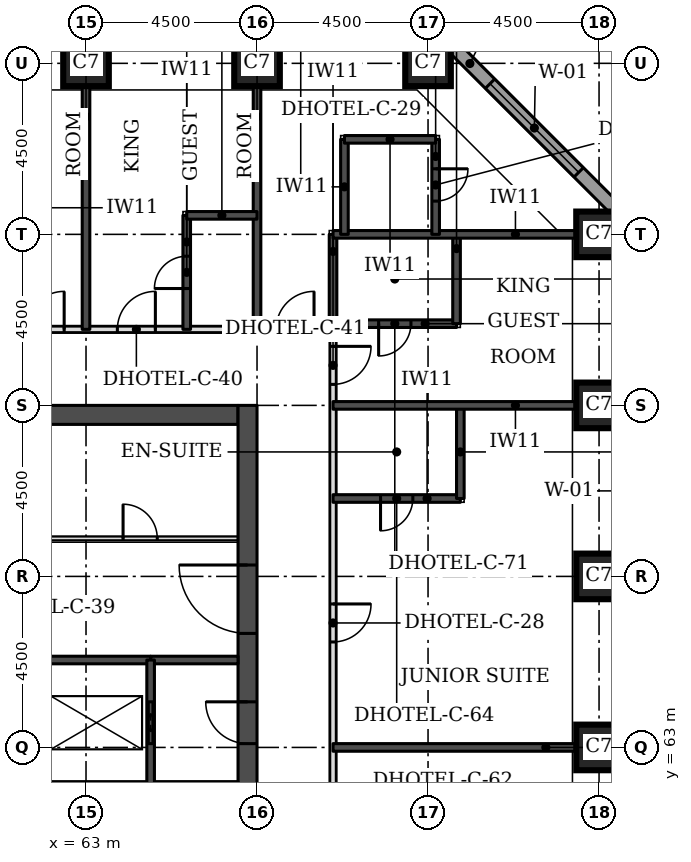
"""IFC4 building model, lengths in metres.
Left out: names, types, materials, properties, quantities, classifications, styles, units other than length and angle.
Written with IfcOpenShell. Run it as: python <this file> out.ifc"""

import sys

from ifc_helpers import new_model, si_unit, direction, frame, frame_2d, origin, origin_2d, place, context, subcontext, project, spatial, rectangle, extrude, element, fill, save


model = new_model("IFC4")
c1 = context("Model", 3, precision=1e-05, world=origin(), true_north=direction((0.0, 1.0)))
c2 = subcontext(c1, "Body", "Model", "MODEL_VIEW")
j1 = project(units=[si_unit("LENGTHUNIT", "METRE"), si_unit("PLANEANGLEUNIT", "RADIAN")], contexts=[c1])
p1 = place(None, origin())
s1 = spatial("IfcSite", under=j1, at=p1, CompositionType="ELEMENT")
p2 = place(p1, origin())
s2 = spatial("IfcBuilding", under=s1, at=p2, CompositionType="ELEMENT")
p3 = place(p2, frame((0.0, 0.0, 56.1)))
s3 = spatial("IfcBuildingStorey", under=s2, at=p3, CompositionType="ELEMENT", Elevation=56.1)
for number, where, z_axis, x_axis in (
    (1, (76.5, 63.0, 0.0), (0.0, 0.0, 1.0), (1.0, 0.0, 0.0)),
    (2, (76.5, 67.5, 0.0), (0.0, 0.0, 1.0), (1.0, 0.0, 0.0)),
    (3, (76.5, 72.0, 0.0), (0.0, 0.0, 1.0), (1.0, 0.0, 0.0)),
    (4, (76.5, 76.5, 0.0), (0.0, 0.0, 1.0), (1.0, 0.0, 0.0)),
    (5, (63.0, 81.0, 0.0), (0.0, 0.0, 1.0), (1.0, 0.0, 0.0)),
    (6, (67.5, 81.0, 0.0), (0.0, 0.0, 1.0), (1.0, 0.0, 0.0)),
    (7, (72.0, 81.0, 0.0), (0.0, 0.0, 1.0), (1.0, 0.0, 0.0)),
):
    element("IfcColumn", number, at=place(p3, frame(where, z_axis=z_axis, x_axis=x_axis)), inside=s3, PredefinedType="COLUMN", context=c2, shape_type="SweptSolid", body=[
        extrude(rectangle(XDim=1.2, YDim=1.2, at=origin_2d()), origin(), (0.0, 0.0, 1.0), 3.3),
    ])
p4 = place(p3, frame((45.5, 71.75, 0.0), z_axis=(0.0, 0.0, 1.0), x_axis=(1.0, 0.0, 0.0)))
e8 = element("IfcWall", 8, at=p4, inside=s3, PredefinedType="SHEAR", context=c2, shape_type="SweptSolid", body=[
    extrude(rectangle(XDim=21.5, YDim=0.5, at=frame_2d((10.75, 0.0))), origin(), (0.0, 0.0, 1.0), 3.3),
])
p5 = place(p3, frame((67.25, 49.5, 0.0), z_axis=(0.0, 0.0, 1.0), x_axis=(0.0, 1.0, 0.0)))
e9 = element("IfcWall", 9, at=p5, inside=s3, PredefinedType="SHEAR", context=c2, shape_type="SweptSolid", body=[
    extrude(rectangle(XDim=22.5, YDim=0.5, at=frame_2d((11.25, 0.0))), origin(), (0.0, 0.0, 1.0), 3.3),
])
p6 = place(p5, frame((4.2, 0.0, 0.0)))
e10 = element("IfcOpeningElement", 10, at=p6, cuts=e9, PredefinedType="OPENING", context=c2, shape_type="SweptSolid", body=[
    extrude(rectangle(XDim=1.8, YDim=2.1, at=frame_2d((0.9, 1.05))), frame((0.0, 0.26, 0.0), z_axis=(0.0, -1.0, 0.0), x_axis=(1.0, 0.0, 0.0)), (0.0, 0.0, 1.0), 0.52),
])
p7 = place(p5, frame((6.9, 0.0, 0.0)))
e11 = element("IfcOpeningElement", 11, at=p7, cuts=e9, PredefinedType="OPENING", context=c2, shape_type="SweptSolid", body=[
    extrude(rectangle(XDim=1.1, YDim=2.1, at=frame_2d((0.55, 1.05))), frame((0.0, 0.26, 0.0), z_axis=(0.0, -1.0, 0.0), x_axis=(1.0, 0.0, 0.0)), (0.0, 0.0, 1.0), 0.52),
])
p8 = place(p5, frame((13.6, 0.0, 0.0)))
e12 = element("IfcOpeningElement", 12, at=p8, cuts=e9, PredefinedType="OPENING", context=c2, shape_type="SweptSolid", body=[
    extrude(rectangle(XDim=1.1, YDim=2.1, at=frame_2d((0.55, 1.05))), frame((0.0, 0.26, 0.0), z_axis=(0.0, -1.0, 0.0), x_axis=(1.0, 0.0, 0.0)), (0.0, 0.0, 1.0), 0.52),
])
p9 = place(p5, frame((16.5, 0.0, 0.0)))
e13 = element("IfcOpeningElement", 13, at=p9, cuts=e9, PredefinedType="OPENING", context=c2, shape_type="SweptSolid", body=[
    extrude(rectangle(XDim=1.8, YDim=2.1, at=frame_2d((0.9, 1.05))), frame((0.0, 0.26, 0.0), z_axis=(0.0, -1.0, 0.0), x_axis=(1.0, 0.0, 0.0)), (0.0, 0.0, 1.0), 0.52),
])
p10 = place(p3, frame((77.326, 76.77, 0.0), z_axis=(0.0, 0.0, 1.0), x_axis=(-0.707106781187, 0.707106781187, 0.0)))
e14 = element("IfcWall", 14, at=p10, inside=s3, PredefinedType="STANDARD", context=c2, shape_type="SweptSolid", body=[
    extrude(rectangle(XDim=7.151, YDim=0.35, at=frame_2d((3.576, 0.0))), origin(), (0.0, 0.0, 1.0), 3.055),
])
p11 = place(p10, frame((1.926, 0.0, 0.8)))
e15 = element("IfcOpeningElement", 15, at=p11, cuts=e14, PredefinedType="OPENING", context=c2, shape_type="SweptSolid", body=[
    extrude(rectangle(XDim=3.3, YDim=1.5, at=frame_2d((1.65, 0.75))), frame((0.0, 0.185, 0.0), z_axis=(0.0, -1.0, 0.0), x_axis=(1.0, 0.0, 0.0)), (0.0, 0.0, 1.0), 0.37),
])
p12 = place(p3, frame((69.5, 47.5, 0.0), z_axis=(0.0, 0.0, 1.0), x_axis=(0.0, 1.0, 0.0)))
e16 = element("IfcWall", 16, at=p12, inside=s3, PredefinedType="PARTITIONING", context=c2, shape_type="SweptSolid", body=[
    extrude(rectangle(XDim=26.5, YDim=0.15, at=frame_2d((13.25, 0.0))), origin(), (0.0, 0.0, 1.0), 3.08),
])
p13 = place(p12, frame((25.053, 0.0, 0.0)))
e17 = element("IfcOpeningElement", 17, at=p13, cuts=e16, PredefinedType="OPENING", context=c2, shape_type="SweptSolid", body=[
    extrude(rectangle(XDim=1.0, YDim=2.1, at=frame_2d((0.5, 1.05))), frame((0.0, 0.085, 0.0), z_axis=(0.0, -1.0, 0.0), x_axis=(1.0, 0.0, 0.0)), (0.0, 0.0, 1.0), 0.17),
])
p14 = place(p12, frame((18.275, 0.0, 0.0)))
e18 = element("IfcOpeningElement", 18, at=p14, cuts=e16, PredefinedType="OPENING", context=c2, shape_type="SweptSolid", body=[
    extrude(rectangle(XDim=1.0, YDim=2.1, at=frame_2d((0.5, 1.05))), frame((0.0, 0.085, 0.0), z_axis=(0.0, -1.0, 0.0), x_axis=(1.0, 0.0, 0.0)), (0.0, 0.0, 1.0), 0.17),
])
p15 = place(p12, frame((12.15, 0.0, 0.0)))
e19 = element("IfcOpeningElement", 19, at=p15, cuts=e16, PredefinedType="OPENING", context=c2, shape_type="SweptSolid", body=[
    extrude(rectangle(XDim=1.1, YDim=2.1, at=frame_2d((0.55, 1.05))), frame((0.0, 0.085, 0.0), z_axis=(0.0, -1.0, 0.0), x_axis=(1.0, 0.0, 0.0)), (0.0, 0.0, 1.0), 0.17),
])
p16 = place(p12, frame((2.825, 0.0, 0.0)))
e20 = element("IfcOpeningElement", 20, at=p16, cuts=e16, PredefinedType="OPENING", context=c2, shape_type="SweptSolid", body=[
    extrude(rectangle(XDim=1.0, YDim=2.1, at=frame_2d((0.5, 1.05))), frame((0.0, 0.085, 0.0), z_axis=(0.0, -1.0, 0.0), x_axis=(1.0, 0.0, 0.0)), (0.0, 0.0, 1.0), 0.17),
])
p17 = place(p12, frame((0.447, 0.0, 0.0)))
e21 = element("IfcOpeningElement", 21, at=p17, cuts=e16, PredefinedType="OPENING", context=c2, shape_type="SweptSolid", body=[
    extrude(rectangle(XDim=1.0, YDim=2.1, at=frame_2d((0.5, 1.05))), frame((0.0, 0.085, 0.0), z_axis=(0.0, -1.0, 0.0), x_axis=(1.0, 0.0, 0.0)), (0.0, 0.0, 1.0), 0.17),
])
p18 = place(p3, frame((43.0, 74.0, 0.0), z_axis=(0.0, 0.0, 1.0), x_axis=(1.0, 0.0, 0.0)))
e22 = element("IfcWall", 22, at=p18, inside=s3, PredefinedType="PARTITIONING", context=c2, shape_type="SweptSolid", body=[
    extrude(rectangle(XDim=26.5, YDim=0.15, at=frame_2d((13.25, 0.0))), origin(), (0.0, 0.0, 1.0), 3.08),
])
p19 = place(p18, frame((2.825, 0.0, 0.0)))
e23 = element("IfcOpeningElement", 23, at=p19, cuts=e22, PredefinedType="OPENING", context=c2, shape_type="SweptSolid", body=[
    extrude(rectangle(XDim=1.0, YDim=2.1, at=frame_2d((0.5, 1.05))), frame((0.0, 0.085, 0.0), z_axis=(0.0, -1.0, 0.0), x_axis=(1.0, 0.0, 0.0)), (0.0, 0.0, 1.0), 0.17),
])
p20 = place(p18, frame((9.425, 0.0, 0.0)))
e24 = element("IfcOpeningElement", 24, at=p20, cuts=e22, PredefinedType="OPENING", context=c2, shape_type="SweptSolid", body=[
    extrude(rectangle(XDim=1.0, YDim=2.1, at=frame_2d((0.5, 1.05))), frame((0.0, 0.085, 0.0), z_axis=(0.0, -1.0, 0.0), x_axis=(1.0, 0.0, 0.0)), (0.0, 0.0, 1.0), 0.17),
])
p21 = place(p18, frame((11.825, 0.0, 0.0)))
e25 = element("IfcOpeningElement", 25, at=p21, cuts=e22, PredefinedType="OPENING", context=c2, shape_type="SweptSolid", body=[
    extrude(rectangle(XDim=1.0, YDim=2.1, at=frame_2d((0.5, 1.05))), frame((0.0, 0.085, 0.0), z_axis=(0.0, -1.0, 0.0), x_axis=(1.0, 0.0, 0.0)), (0.0, 0.0, 1.0), 0.17),
])
p22 = place(p18, frame((18.425, 0.0, 0.0)))
e26 = element("IfcOpeningElement", 26, at=p22, cuts=e22, PredefinedType="OPENING", context=c2, shape_type="SweptSolid", body=[
    extrude(rectangle(XDim=1.0, YDim=2.1, at=frame_2d((0.5, 1.05))), frame((0.0, 0.085, 0.0), z_axis=(0.0, -1.0, 0.0), x_axis=(1.0, 0.0, 0.0)), (0.0, 0.0, 1.0), 0.17),
])
p23 = place(p18, frame((20.825, 0.0, 0.0)))
e27 = element("IfcOpeningElement", 27, at=p23, cuts=e22, PredefinedType="OPENING", context=c2, shape_type="SweptSolid", body=[
    extrude(rectangle(XDim=1.0, YDim=2.1, at=frame_2d((0.5, 1.05))), frame((0.0, 0.085, 0.0), z_axis=(0.0, -1.0, 0.0), x_axis=(1.0, 0.0, 0.0)), (0.0, 0.0, 1.0), 0.17),
])
p24 = place(p18, frame((0.5, 0.0, 0.0)))
e28 = element("IfcOpeningElement", 28, at=p24, cuts=e22, PredefinedType="OPENING", context=c2, shape_type="SweptSolid", body=[
    extrude(rectangle(XDim=1.0, YDim=2.1, at=frame_2d((0.5, 1.05))), frame((0.0, 0.085, 0.0), z_axis=(0.0, -1.0, 0.0), x_axis=(1.0, 0.0, 0.0)), (0.0, 0.0, 1.0), 0.17),
])
p25 = place(p18, frame((25.0, 0.0, 0.0)))
e29 = element("IfcOpeningElement", 29, at=p25, cuts=e22, PredefinedType="OPENING", context=c2, shape_type="SweptSolid", body=[
    extrude(rectangle(XDim=1.0, YDim=2.1, at=frame_2d((0.5, 1.05))), frame((0.0, 0.085, 0.0), z_axis=(0.0, -1.0, 0.0), x_axis=(1.0, 0.0, 0.0)), (0.0, 0.0, 1.0), 0.17),
])
p26 = place(p3, frame((69.5, 63.0, 0.0), z_axis=(0.0, 0.0, 1.0), x_axis=(1.0, 0.0, 0.0)))
e30 = element("IfcWall", 30, at=p26, inside=s3, PredefinedType="SOLIDWALL", context=c2, shape_type="SweptSolid", body=[
    extrude(rectangle(XDim=6.4, YDim=0.2, at=frame_2d((3.2, 0.0))), origin(), (0.0, 0.0, 1.0), 3.08),
])
p27 = place(p3, frame((69.5, 69.55, 0.0), z_axis=(0.0, 0.0, 1.0), x_axis=(1.0, 0.0, 0.0)))
e31 = element("IfcWall", 31, at=p27, inside=s3, PredefinedType="SOLIDWALL", context=c2, shape_type="SweptSolid", body=[
    extrude(rectangle(XDim=3.35, YDim=0.2, at=frame_2d((1.675, 0.0))), origin(), (0.0, 0.0, 1.0), 3.08),
])
p28 = place(p27, frame((1.25, 0.0, 0.0)))
e32 = element("IfcOpeningElement", 32, at=p28, cuts=e31, PredefinedType="OPENING", context=c2, shape_type="SweptSolid", body=[
    extrude(rectangle(XDim=0.85, YDim=2.1, at=frame_2d((0.425, 1.05))), frame((0.0, 0.11, 0.0), z_axis=(0.0, -1.0, 0.0), x_axis=(1.0, 0.0, 0.0)), (0.0, 0.0, 1.0), 0.22),
])
p29 = place(p3, frame((72.85, 69.55, 0.0), z_axis=(0.0, 0.0, 1.0), x_axis=(0.0, 1.0, 0.0)))
e33 = element("IfcWall", 33, at=p29, inside=s3, PredefinedType="SOLIDWALL", context=c2, shape_type="SweptSolid", body=[
    extrude(rectangle(XDim=2.45, YDim=0.2, at=frame_2d((1.225, 0.0))), origin(), (0.0, 0.0, 1.0), 3.08),
])
for number, where, z_axis, x_axis in (
    (34, (69.5, 72.0, 0.0), (0.0, 0.0, 1.0), (1.0, 0.0, 0.0)),
    (35, (63.0, 74.0, 0.0), (0.0, 0.0, 1.0), (0.0, 1.0, 0.0)),
):
    element("IfcWall", number, at=place(p3, frame(where, z_axis=z_axis, x_axis=x_axis)), inside=s3, PredefinedType="SOLIDWALL", context=c2, shape_type="SweptSolid", body=[
        extrude(rectangle(XDim=6.4, YDim=0.2, at=frame_2d((3.2, 0.0))), origin(), (0.0, 0.0, 1.0), 3.08),
    ])
p30 = place(p3, frame((65.65, 74.0, 0.0), z_axis=(0.0, 0.0, 1.0), x_axis=(0.0, 1.0, 0.0)))
e36 = element("IfcWall", 36, at=p30, inside=s3, PredefinedType="SOLIDWALL", context=c2, shape_type="SweptSolid", body=[
    extrude(rectangle(XDim=3.0, YDim=0.2, at=frame_2d((1.5, 0.0))), origin(), (0.0, 0.0, 1.0), 3.08),
])
p31 = place(p30, frame((1.075, 0.0, 0.0)))
e37 = element("IfcOpeningElement", 37, at=p31, cuts=e36, PredefinedType="OPENING", context=c2, shape_type="SweptSolid", body=[
    extrude(rectangle(XDim=0.85, YDim=2.1, at=frame_2d((0.425, 1.05))), frame((0.0, 0.11, 0.0), z_axis=(0.0, -1.0, 0.0), x_axis=(1.0, 0.0, 0.0)), (0.0, 0.0, 1.0), 0.22),
])
p32 = place(p3, frame((67.5, 74.0, 0.0), z_axis=(0.0, 0.0, 1.0), x_axis=(0.0, 1.0, 0.0)))
e38 = element("IfcWall", 38, at=p32, inside=s3, PredefinedType="SOLIDWALL", context=c2, shape_type="SweptSolid", body=[
    extrude(rectangle(XDim=6.4, YDim=0.2, at=frame_2d((3.2, 0.0))), origin(), (0.0, 0.0, 1.0), 3.08),
])
p33 = place(p3, frame((69.5, 74.0, 0.0), z_axis=(0.0, 0.0, 1.0), x_axis=(0.0, 1.0, 0.0)))
e39 = element("IfcWall", 39, at=p33, inside=s3, PredefinedType="SOLIDWALL", context=c2, shape_type="SweptSolid", body=[
    extrude(rectangle(XDim=2.5, YDim=0.2, at=frame_2d((1.25, 0.0))), origin(), (0.0, 0.0, 1.0), 3.08),
])
p34 = place(p3, frame((69.5, 74.15, 0.0), z_axis=(0.0, 0.0, 1.0), x_axis=(1.0, 0.0, 0.0)))
e40 = element("IfcWall", 40, at=p34, inside=s3, PredefinedType="SOLIDWALL", context=c2, shape_type="SweptSolid", body=[
    extrude(rectangle(XDim=3.25, YDim=0.2, at=frame_2d((1.625, 0.0))), origin(), (0.0, 0.0, 1.0), 3.08),
])
p35 = place(p34, frame((1.2, 0.0, 0.0)))
e41 = element("IfcOpeningElement", 41, at=p35, cuts=e40, PredefinedType="OPENING", context=c2, shape_type="SweptSolid", body=[
    extrude(rectangle(XDim=0.85, YDim=2.1, at=frame_2d((0.425, 1.05))), frame((0.0, 0.11, 0.0), z_axis=(0.0, -1.0, 0.0), x_axis=(1.0, 0.0, 0.0)), (0.0, 0.0, 1.0), 0.22),
])
p36 = place(p3, frame((72.75, 74.15, 0.0), z_axis=(0.0, 0.0, 1.0), x_axis=(0.0, 1.0, 0.0)))
e42 = element("IfcWall", 42, at=p36, inside=s3, PredefinedType="SOLIDWALL", context=c2, shape_type="SweptSolid", body=[
    extrude(rectangle(XDim=2.35, YDim=0.2, at=frame_2d((1.175, 0.0))), origin(), (0.0, 0.0, 1.0), 3.08),
])
p37 = place(p3, frame((69.5, 76.5, 0.0), z_axis=(0.0, 0.0, 1.0), x_axis=(1.0, 0.0, 0.0)))
e43 = element("IfcWall", 43, at=p37, inside=s3, PredefinedType="SOLIDWALL", context=c2, shape_type="SweptSolid", body=[
    extrude(rectangle(XDim=6.4, YDim=0.2, at=frame_2d((3.2, 0.0))), origin(), (0.0, 0.0, 1.0), 3.08),
])
p38 = place(p3, frame((69.8, 76.5, 0.0), z_axis=(0.0, 0.0, 1.0), x_axis=(0.0, 1.0, 0.0)))
e44 = element("IfcWall", 44, at=p38, inside=s3, PredefinedType="SOLIDWALL", context=c2, shape_type="SweptSolid", body=[
    extrude(rectangle(XDim=2.5, YDim=0.2, at=frame_2d((1.25, 0.0))), origin(), (0.0, 0.0, 1.0), 3.08),
])
p39 = place(p3, frame((72.2, 76.5, 0.0), z_axis=(0.0, 0.0, 1.0), x_axis=(0.0, 1.0, 0.0)))
e45 = element("IfcWall", 45, at=p39, inside=s3, PredefinedType="SOLIDWALL", context=c2, shape_type="SweptSolid", body=[
    extrude(rectangle(XDim=2.5, YDim=0.2, at=frame_2d((1.25, 0.0))), origin(), (0.0, 0.0, 1.0), 3.08),
])
p40 = place(p39, frame((0.875, 0.0, 0.0)))
e46 = element("IfcOpeningElement", 46, at=p40, cuts=e45, PredefinedType="OPENING", context=c2, shape_type="SweptSolid", body=[
    extrude(rectangle(XDim=0.85, YDim=2.1, at=frame_2d((0.425, 1.05))), frame((0.0, 0.11, 0.0), z_axis=(0.0, -1.0, 0.0), x_axis=(1.0, 0.0, 0.0)), (0.0, 0.0, 1.0), 0.22),
])
p41 = place(p3, frame((65.65, 77.0, 0.0), z_axis=(0.0, 0.0, 1.0), x_axis=(1.0, 0.0, 0.0)))
e47 = element("IfcWall", 47, at=p41, inside=s3, PredefinedType="SOLIDWALL", context=c2, shape_type="SweptSolid", body=[
    extrude(rectangle(XDim=1.85, YDim=0.2, at=frame_2d((0.925, 0.0))), origin(), (0.0, 0.0, 1.0), 3.08),
])
p42 = place(p3, frame((69.8, 79.0, 0.0), z_axis=(0.0, 0.0, 1.0), x_axis=(1.0, 0.0, 0.0)))
e48 = element("IfcWall", 48, at=p42, inside=s3, PredefinedType="SOLIDWALL", context=c2, shape_type="SweptSolid", body=[
    extrude(rectangle(XDim=2.4, YDim=0.2, at=frame_2d((1.2, 0.0))), origin(), (0.0, 0.0, 1.0), 3.08),
])
p43 = place(p3, frame((64.7, 65.3, 0.0), z_axis=(0.0, 0.0, 1.0), x_axis=(1.0, 0.0, 0.0)))
e49 = element("IfcWall", 49, at=p43, inside=s3, PredefinedType="SOLIDWALL", context=c2, shape_type="SweptSolid", body=[
    extrude(rectangle(XDim=2.3, YDim=0.2, at=frame_2d((1.15, 0.0))), origin(), (0.0, 0.0, 1.0), 3.08),
])
p44 = place(p3, frame((47.8, 65.3, 0.0), z_axis=(0.0, 0.0, 1.0), x_axis=(1.0, 0.0, 0.0)))
e50 = element("IfcWall", 50, at=p44, inside=s3, PredefinedType="SOLIDWALL", context=c2, shape_type="SweptSolid", body=[
    extrude(rectangle(XDim=16.9, YDim=0.2, at=frame_2d((8.45, 0.0))), origin(), (0.0, 0.0, 1.0), 3.08),
])
p45 = place(p3, frame((61.85, 68.5, 0.0), z_axis=(0.0, 0.0, 1.0), x_axis=(1.0, 0.0, 0.0)))
e51 = element("IfcWall", 51, at=p45, inside=s3, PredefinedType="PARTITIONING", context=c2, shape_type="SweptSolid", body=[
    extrude(rectangle(XDim=5.15, YDim=0.1, at=frame_2d((2.575, 0.0))), origin(), (0.0, 0.0, 1.0), 3.08),
])
p46 = place(p45, frame((2.125, 0.0, 0.0)))
e52 = element("IfcOpeningElement", 52, at=p46, cuts=e51, PredefinedType="OPENING", context=c2, shape_type="SweptSolid", body=[
    extrude(rectangle(XDim=0.9, YDim=2.1, at=frame_2d((0.45, 1.05))), frame((0.0, 0.06, 0.0), z_axis=(0.0, -1.0, 0.0), x_axis=(1.0, 0.0, 0.0)), (0.0, 0.0, 1.0), 0.12),
])
p47 = place(p3, frame((64.7, 62.0, 0.0), z_axis=(0.0, 0.0, 1.0), x_axis=(0.0, 1.0, 0.0)))
e53 = element("IfcWall", 53, at=p47, inside=s3, PredefinedType="SOLIDWALL", context=c2, shape_type="SweptSolid", body=[
    extrude(rectangle(XDim=3.3, YDim=0.2, at=frame_2d((1.65, 0.0))), origin(), (0.0, 0.0, 1.0), 3.08),
])
p48 = place(p47, frame((1.1, 0.0, 0.0)))
e54 = element("IfcOpeningElement", 54, at=p48, cuts=e53, PredefinedType="OPENING", context=c2, shape_type="SweptSolid", body=[
    extrude(rectangle(XDim=1.1, YDim=2.1, at=frame_2d((0.55, 1.05))), frame((0.0, 0.11, 0.0), z_axis=(0.0, -1.0, 0.0), x_axis=(1.0, 0.0, 0.0)), (0.0, 0.0, 1.0), 0.22),
])
p49 = place(p11, origin())
e55 = element("IfcWindow", 55, at=p49, inside=s3, PartitioningType="SINGLE_PANEL", PredefinedType="WINDOW", context=c2, shape_type="SweptSolid", body=[
    extrude(rectangle(XDim=3.3, YDim=1.5, at=frame_2d((1.65, 0.75))), frame((0.0, 0.085, 0.0), z_axis=(0.0, -1.0, 0.0), x_axis=(1.0, 0.0, 0.0)), (0.0, 0.0, 1.0), 0.06),
])
fill(e15, e55)
p50 = place(p22, origin())
e56 = element("IfcDoor", 56, at=p50, inside=s3, OperationType="SINGLE_SWING_RIGHT", PredefinedType="DOOR", context=c2, shape_type="SweptSolid", body=[
    extrude(rectangle(XDim=1.0, YDim=2.1, at=frame_2d((0.5, 1.05))), frame((0.0, 0.025, 0.0), z_axis=(0.0, -1.0, 0.0), x_axis=(1.0, 0.0, 0.0)), (0.0, 0.0, 1.0), 0.05),
])
fill(e26, e56)
p51 = place(p23, origin())
e57 = element("IfcDoor", 57, at=p51, inside=s3, OperationType="SINGLE_SWING_RIGHT", PredefinedType="DOOR", context=c2, shape_type="SweptSolid", body=[
    extrude(rectangle(XDim=1.0, YDim=2.1, at=frame_2d((0.5, 1.05))), frame((0.0, 0.025, 0.0), z_axis=(0.0, -1.0, 0.0), x_axis=(1.0, 0.0, 0.0)), (0.0, 0.0, 1.0), 0.05),
])
fill(e27, e57)
p52 = place(p31, origin())
e58 = element("IfcDoor", 58, at=p52, inside=s3, OperationType="SINGLE_SWING_LEFT", PredefinedType="DOOR", context=c2, shape_type="SweptSolid", body=[
    extrude(rectangle(XDim=0.85, YDim=2.1, at=frame_2d((0.425, 1.05))), frame((0.0, 0.025, 0.0), z_axis=(0.0, -1.0, 0.0), x_axis=(1.0, 0.0, 0.0)), (0.0, 0.0, 1.0), 0.05),
])
fill(e37, e58)
p53 = place(p13, frame((1.0, 0.0, 0.0), z_axis=(0.0, 0.0, 1.0), x_axis=(-1.0, 0.0, 0.0)))
e59 = element("IfcDoor", 59, at=p53, inside=s3, OperationType="SINGLE_SWING_LEFT", PredefinedType="DOOR", context=c2, shape_type="SweptSolid", body=[
    extrude(rectangle(XDim=1.0, YDim=2.1, at=frame_2d((0.5, 1.05))), frame((0.0, 0.025, 0.0), z_axis=(0.0, -1.0, 0.0), x_axis=(1.0, 0.0, 0.0)), (0.0, 0.0, 1.0), 0.05),
])
fill(e17, e59)
p54 = place(p35, frame((0.85, 0.0, 0.0), z_axis=(0.0, 0.0, 1.0), x_axis=(-1.0, 0.0, 0.0)))
e60 = element("IfcDoor", 60, at=p54, inside=s3, OperationType="SINGLE_SWING_RIGHT", PredefinedType="DOOR", context=c2, shape_type="SweptSolid", body=[
    extrude(rectangle(XDim=0.85, YDim=2.1, at=frame_2d((0.425, 1.05))), frame((0.0, 0.025, 0.0), z_axis=(0.0, -1.0, 0.0), x_axis=(1.0, 0.0, 0.0)), (0.0, 0.0, 1.0), 0.05),
])
fill(e41, e60)
p55 = place(p14, frame((1.0, 0.0, 0.0), z_axis=(0.0, 0.0, 1.0), x_axis=(-1.0, 0.0, 0.0)))
e61 = element("IfcDoor", 61, at=p55, inside=s3, OperationType="SINGLE_SWING_LEFT", PredefinedType="DOOR", context=c2, shape_type="SweptSolid", body=[
    extrude(rectangle(XDim=1.0, YDim=2.1, at=frame_2d((0.5, 1.05))), frame((0.0, 0.025, 0.0), z_axis=(0.0, -1.0, 0.0), x_axis=(1.0, 0.0, 0.0)), (0.0, 0.0, 1.0), 0.05),
])
fill(e18, e61)
p56 = place(p28, frame((0.85, 0.0, 0.0), z_axis=(0.0, 0.0, 1.0), x_axis=(-1.0, 0.0, 0.0)))
e62 = element("IfcDoor", 62, at=p56, inside=s3, OperationType="SINGLE_SWING_RIGHT", PredefinedType="DOOR", context=c2, shape_type="SweptSolid", body=[
    extrude(rectangle(XDim=0.85, YDim=2.1, at=frame_2d((0.425, 1.05))), frame((0.0, 0.025, 0.0), z_axis=(0.0, -1.0, 0.0), x_axis=(1.0, 0.0, 0.0)), (0.0, 0.0, 1.0), 0.05),
])
fill(e32, e62)
p57 = place(p25, origin())
e63 = element("IfcDoor", 63, at=p57, inside=s3, OperationType="SINGLE_SWING_RIGHT", PredefinedType="DOOR", context=c2, shape_type="SweptSolid", body=[
    extrude(rectangle(XDim=1.0, YDim=2.1, at=frame_2d((0.5, 1.05))), frame((0.0, 0.025, 0.0), z_axis=(0.0, -1.0, 0.0), x_axis=(1.0, 0.0, 0.0)), (0.0, 0.0, 1.0), 0.05),
])
fill(e29, e63)
p58 = place(p40, frame((0.85, 0.0, 0.0), z_axis=(0.0, 0.0, 1.0), x_axis=(-1.0, 0.0, 0.0)))
e64 = element("IfcDoor", 64, at=p58, inside=s3, OperationType="SINGLE_SWING_LEFT", PredefinedType="DOOR", context=c2, shape_type="SweptSolid", body=[
    extrude(rectangle(XDim=0.85, YDim=2.1, at=frame_2d((0.425, 1.05))), frame((0.0, 0.025, 0.0), z_axis=(0.0, -1.0, 0.0), x_axis=(1.0, 0.0, 0.0)), (0.0, 0.0, 1.0), 0.05),
])
fill(e46, e64)
p59 = place(p48, origin())
e65 = element("IfcDoor", 65, at=p59, inside=s3, OperationType="DOUBLE_DOOR_SLIDING", PredefinedType="DOOR", context=c2, shape_type="SweptSolid", body=[
    extrude(rectangle(XDim=1.1, YDim=2.1, at=frame_2d((0.55, 1.05))), frame((0.0, 0.025, 0.0), z_axis=(0.0, -1.0, 0.0), x_axis=(1.0, 0.0, 0.0)), (0.0, 0.0, 1.0), 0.05),
])
fill(e54, e65)
p60 = place(p8, origin())
e66 = element("IfcDoor", 66, at=p60, inside=s3, OperationType="SINGLE_SWING_RIGHT", PredefinedType="DOOR", context=c2, shape_type="SweptSolid", body=[
    extrude(rectangle(XDim=1.1, YDim=2.1, at=frame_2d((0.55, 1.05))), frame((0.0, 0.025, 0.0), z_axis=(0.0, -1.0, 0.0), x_axis=(1.0, 0.0, 0.0)), (0.0, 0.0, 1.0), 0.05),
])
fill(e12, e66)
p61 = place(p9, origin())
e67 = element("IfcDoor", 67, at=p61, inside=s3, OperationType="SINGLE_SWING_RIGHT", PredefinedType="DOOR", context=c2, shape_type="SweptSolid", body=[
    extrude(rectangle(XDim=1.8, YDim=2.1, at=frame_2d((0.9, 1.05))), frame((0.0, 0.025, 0.0), z_axis=(0.0, -1.0, 0.0), x_axis=(1.0, 0.0, 0.0)), (0.0, 0.0, 1.0), 0.05),
])
fill(e13, e67)
p62 = place(p46, origin())
e68 = element("IfcDoor", 68, at=p62, inside=s3, OperationType="SINGLE_SWING_LEFT", PredefinedType="DOOR", context=c2, shape_type="SweptSolid", body=[
    extrude(rectangle(XDim=0.9, YDim=2.1, at=frame_2d((0.45, 1.05))), frame((0.0, 0.025, 0.0), z_axis=(0.0, -1.0, 0.0), x_axis=(1.0, 0.0, 0.0)), (0.0, 0.0, 1.0), 0.05),
])
fill(e52, e68)
save(model, sys.argv[1])
